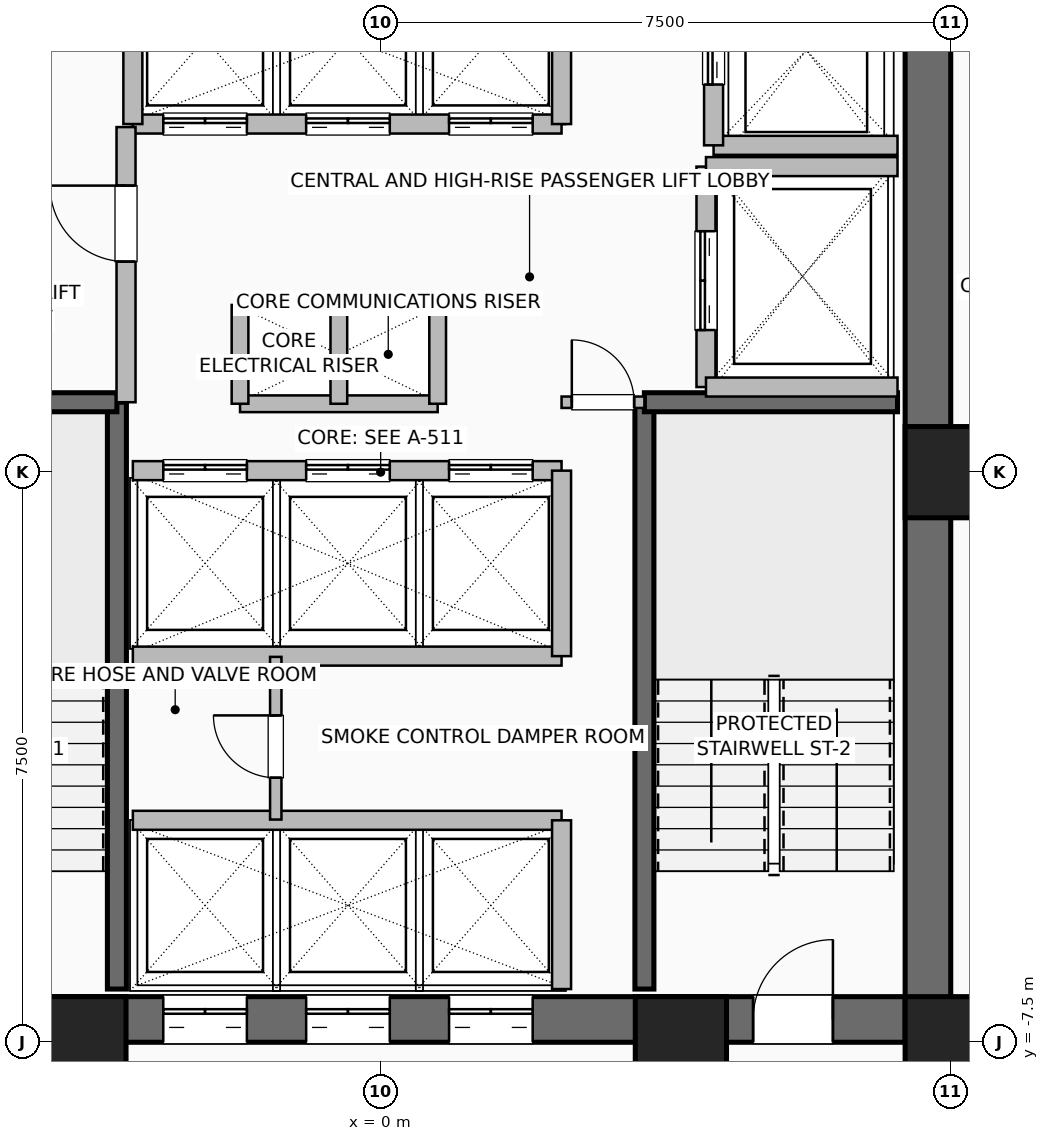
"""IFC4 building model, lengths in metres.
Left out: names, types, materials, properties, quantities, classifications, styles, units other than length and angle.
Written with IfcOpenShell. Run it as: python <this file> out.ifc"""

import sys

from ifc_helpers import new_model, si_unit, direction, frame, frame_2d, origin, origin_2d, place, context, subcontext, project, spatial, rectangle, hollow_rectangle, extrude, element, fill, save


model = new_model("IFC4")
c1 = context("Model", 3, precision=1e-05, world=origin(), true_north=direction((0.0, 1.0)))
c2 = subcontext(c1, "Body", "Model", "MODEL_VIEW")
j1 = project(units=[si_unit("LENGTHUNIT", "METRE"), si_unit("PLANEANGLEUNIT", "RADIAN")], contexts=[c1])
p1 = place(None, origin())
s1 = spatial("IfcSite", under=j1, at=p1, CompositionType="ELEMENT")
p2 = place(p1, origin())
s2 = spatial("IfcBuilding", under=s1, at=p2, CompositionType="ELEMENT")
p3 = place(p2, frame((0.0, 0.0, 41.0)))
s3 = spatial("IfcBuildingStorey", under=s2, at=p3, CompositionType="ELEMENT", Elevation=41.0)
for number, where, z_axis, x_axis in (
    (1, (-3.95, -7.5, 0.0), (0.0, 0.0, 1.0), (1.0, 0.0, 0.0)),
    (2, (3.95, -7.5, 0.0), (0.0, 0.0, 1.0), (1.0, 0.0, 0.0)),
    (3, (7.5, -7.5, 0.0), (0.0, 0.0, 1.0), (1.0, 0.0, 0.0)),
    (4, (7.5, 0.0, 0.0), (0.0, 0.0, 1.0), (1.0, 0.0, 0.0)),
):
    element("IfcColumn", number, at=place(p3, frame(where, z_axis=z_axis, x_axis=x_axis)), inside=s3, PredefinedType="COLUMN", context=c2, shape_type="SweptSolid", body=[
        extrude(hollow_rectangle(XDim=1.2, YDim=1.2, WallThickness=0.055, at=origin_2d()), origin(), (0.0, 0.0, 1.0), 3.5),
    ])
p4 = place(p3, frame((-7.5, -7.2, 0.0), z_axis=(0.0, 0.0, 1.0), x_axis=(1.0, 0.0, 0.0)))
e5 = element("IfcWall", 5, at=p4, inside=s3, PredefinedType="SHEAR", context=c2, shape_type="SweptSolid", body=[
    extrude(rectangle(XDim=15.0, YDim=0.6, at=frame_2d((7.5, 0.0))), origin(), (0.0, 0.0, 1.0), 3.25),
])
p5 = place(p4, frame((1.55, 0.0, 0.0)))
e6 = element("IfcOpeningElement", 6, at=p5, cuts=e5, PredefinedType="OPENING", context=c2, shape_type="SweptSolid", body=[
    extrude(rectangle(XDim=1.05, YDim=2.08, at=frame_2d((0.525, 1.04))), frame((0.0, 0.31, 0.0), z_axis=(0.0, -1.0, 0.0), x_axis=(1.0, 0.0, 0.0)), (0.0, 0.0, 1.0), 0.62),
])
p6 = place(p4, frame((12.4, 0.0, 0.0)))
e7 = element("IfcOpeningElement", 7, at=p6, cuts=e5, PredefinedType="OPENING", context=c2, shape_type="SweptSolid", body=[
    extrude(rectangle(XDim=1.05, YDim=2.08, at=frame_2d((0.525, 1.04))), frame((0.0, 0.31, 0.0), z_axis=(0.0, -1.0, 0.0), x_axis=(1.0, 0.0, 0.0)), (0.0, 0.0, 1.0), 0.62),
])
p7 = place(p4, frame((4.64, 0.0, 0.0)))
e8 = element("IfcOpeningElement", 8, at=p7, cuts=e5, PredefinedType="OPENING", context=c2, shape_type="SweptSolid", body=[
    extrude(rectangle(XDim=1.1, YDim=2.2, at=frame_2d((0.55, 1.1))), frame((0.0, 0.31, 0.0), z_axis=(0.0, -1.0, 0.0), x_axis=(1.0, 0.0, 0.0)), (0.0, 0.0, 1.0), 0.62),
])
p8 = place(p4, frame((6.52, 0.0, 0.0)))
e9 = element("IfcOpeningElement", 9, at=p8, cuts=e5, PredefinedType="OPENING", context=c2, shape_type="SweptSolid", body=[
    extrude(rectangle(XDim=1.1, YDim=2.2, at=frame_2d((0.55, 1.1))), frame((0.0, 0.31, 0.0), z_axis=(0.0, -1.0, 0.0), x_axis=(1.0, 0.0, 0.0)), (0.0, 0.0, 1.0), 0.62),
])
p9 = place(p4, frame((8.4, 0.0, 0.0)))
e10 = element("IfcOpeningElement", 10, at=p9, cuts=e5, PredefinedType="OPENING", context=c2, shape_type="SweptSolid", body=[
    extrude(rectangle(XDim=1.1, YDim=2.2, at=frame_2d((0.55, 1.1))), frame((0.0, 0.31, 0.0), z_axis=(0.0, -1.0, 0.0), x_axis=(1.0, 0.0, 0.0)), (0.0, 0.0, 1.0), 0.62),
])
p10 = place(p3, frame((7.2, -7.5, 0.0), z_axis=(0.0, 0.0, 1.0), x_axis=(0.0, 1.0, 0.0)))
e11 = element("IfcWall", 11, at=p10, inside=s3, PredefinedType="SHEAR", context=c2, shape_type="SweptSolid", body=[
    extrude(rectangle(XDim=15.0, YDim=0.6, at=frame_2d((7.5, 0.0))), origin(), (0.0, 0.0, 1.0), 3.25),
])
p11 = place(p3, frame((-3.47, -6.8, 0.0), z_axis=(0.0, 0.0, 1.0), x_axis=(0.0, 1.0, 0.0)))
e12 = element("IfcWall", 12, at=p11, inside=s3, PredefinedType="SHEAR", context=c2, shape_type="SweptSolid", body=[
    extrude(rectangle(XDim=7.72, YDim=0.25, at=frame_2d((3.86, 0.0))), origin(), (0.0, 0.0, 1.0), 3.25),
])
p12 = place(p3, frame((-6.8, 0.92, 0.0), z_axis=(0.0, 0.0, 1.0), x_axis=(1.0, 0.0, 0.0)))
e13 = element("IfcWall", 13, at=p12, inside=s3, PredefinedType="SHEAR", context=c2, shape_type="SweptSolid", body=[
    extrude(rectangle(XDim=3.33, YDim=0.25, at=frame_2d((1.665, 0.0))), origin(), (0.0, 0.0, 1.0), 3.25),
])
p13 = place(p3, frame((3.47, -6.8, 0.0), z_axis=(0.0, 0.0, 1.0), x_axis=(0.0, 1.0, 0.0)))
e14 = element("IfcWall", 14, at=p13, inside=s3, PredefinedType="SHEAR", context=c2, shape_type="SweptSolid", body=[
    extrude(rectangle(XDim=7.72, YDim=0.25, at=frame_2d((3.86, 0.0))), origin(), (0.0, 0.0, 1.0), 3.25),
])
p14 = place(p3, frame((3.47, 0.92, 0.0), z_axis=(0.0, 0.0, 1.0), x_axis=(1.0, 0.0, 0.0)))
e15 = element("IfcWall", 15, at=p14, inside=s3, PredefinedType="SHEAR", context=c2, shape_type="SweptSolid", body=[
    extrude(rectangle(XDim=3.33, YDim=0.25, at=frame_2d((1.665, 0.0))), origin(), (0.0, 0.0, 1.0), 3.25),
])
for number, where, z_axis, x_axis in (
    (16, (-1.85, 2.2, 0.0), (0.0, 0.0, 1.0), (1.0, 0.0, 0.0)),
    (17, (-1.85, 0.9, 0.0), (0.0, 0.0, 1.0), (1.0, 0.0, 0.0)),
):
    element("IfcWall", number, at=place(p3, frame(where, z_axis=z_axis, x_axis=x_axis)), inside=s3, PredefinedType="PARTITIONING", context=c2, shape_type="SweptSolid", body=[
        extrude(rectangle(XDim=2.6, YDim=0.22, at=frame_2d((1.3, 0.0))), origin(), (0.0, 0.0, 1.0), 3.25),
    ])
for number, where, z_axis, x_axis in (
    (18, (-0.55, 0.9, 0.0), (0.0, 0.0, 1.0), (0.0, 1.0, 0.0)),
    (19, (0.75, 0.9, 0.0), (0.0, 0.0, 1.0), (0.0, 1.0, 0.0)),
    (20, (-1.85, 0.9, 0.0), (0.0, 0.0, 1.0), (0.0, 1.0, 0.0)),
):
    element("IfcWall", number, at=place(p3, frame(where, z_axis=z_axis, x_axis=x_axis)), inside=s3, PredefinedType="PARTITIONING", context=c2, shape_type="SweptSolid", body=[
        extrude(rectangle(XDim=1.3, YDim=0.22, at=frame_2d((0.65, 0.0))), origin(), (0.0, 0.0, 1.0), 3.25),
    ])
p15 = place(p3, frame((-3.26, -4.58, 0.0), z_axis=(0.0, 0.0, 1.0), x_axis=(1.0, 0.0, 0.0)))
e21 = element("IfcWall", 21, at=p15, inside=s3, PredefinedType="SHEAR", context=c2, shape_type="SweptSolid", body=[
    extrude(rectangle(XDim=5.64, YDim=0.25, at=frame_2d((2.82, 0.0))), origin(), (0.0, 0.0, 1.0), 3.25),
])
p16 = place(p3, frame((2.38, -6.8, 0.0), z_axis=(0.0, 0.0, 1.0), x_axis=(0.0, 1.0, 0.0)))
e22 = element("IfcWall", 22, at=p16, inside=s3, PredefinedType="SHEAR", context=c2, shape_type="SweptSolid", body=[
    extrude(rectangle(XDim=2.22, YDim=0.25, at=frame_2d((1.11, 0.0))), origin(), (0.0, 0.0, 1.0), 3.25),
])
p17 = place(p3, frame((-3.26, 0.02, 0.0), z_axis=(0.0, 0.0, 1.0), x_axis=(1.0, 0.0, 0.0)))
e23 = element("IfcWall", 23, at=p17, inside=s3, PredefinedType="SHEAR", context=c2, shape_type="SweptSolid", body=[
    extrude(rectangle(XDim=5.64, YDim=0.25, at=frame_2d((2.82, 0.0))), origin(), (0.0, 0.0, 1.0), 3.25),
])
p18 = place(p17, frame((0.4, 0.0, 0.0)))
e24 = element("IfcOpeningElement", 24, at=p18, cuts=e23, PredefinedType="OPENING", context=c2, shape_type="SweptSolid", body=[
    extrude(rectangle(XDim=1.1, YDim=2.2, at=frame_2d((0.55, 1.1))), frame((0.0, 0.135, 0.0), z_axis=(0.0, -1.0, 0.0), x_axis=(1.0, 0.0, 0.0)), (0.0, 0.0, 1.0), 0.27),
])
p19 = place(p17, frame((2.28, 0.0, 0.0)))
e25 = element("IfcOpeningElement", 25, at=p19, cuts=e23, PredefinedType="OPENING", context=c2, shape_type="SweptSolid", body=[
    extrude(rectangle(XDim=1.1, YDim=2.2, at=frame_2d((0.55, 1.1))), frame((0.0, 0.135, 0.0), z_axis=(0.0, -1.0, 0.0), x_axis=(1.0, 0.0, 0.0)), (0.0, 0.0, 1.0), 0.27),
])
p20 = place(p17, frame((4.16, 0.0, 0.0)))
e26 = element("IfcOpeningElement", 26, at=p20, cuts=e23, PredefinedType="OPENING", context=c2, shape_type="SweptSolid", body=[
    extrude(rectangle(XDim=1.1, YDim=2.2, at=frame_2d((0.55, 1.1))), frame((0.0, 0.135, 0.0), z_axis=(0.0, -1.0, 0.0), x_axis=(1.0, 0.0, 0.0)), (0.0, 0.0, 1.0), 0.27),
])
p21 = place(p3, frame((-3.26, -2.42, 0.0), z_axis=(0.0, 0.0, 1.0), x_axis=(1.0, 0.0, 0.0)))
e27 = element("IfcWall", 27, at=p21, inside=s3, PredefinedType="SHEAR", context=c2, shape_type="SweptSolid", body=[
    extrude(rectangle(XDim=5.64, YDim=0.25, at=frame_2d((2.82, 0.0))), origin(), (0.0, 0.0, 1.0), 3.25),
])
p22 = place(p3, frame((2.38, -2.42, 0.0), z_axis=(0.0, 0.0, 1.0), x_axis=(0.0, 1.0, 0.0)))
e28 = element("IfcWall", 28, at=p22, inside=s3, PredefinedType="SHEAR", context=c2, shape_type="SweptSolid", body=[
    extrude(rectangle(XDim=2.44, YDim=0.25, at=frame_2d((1.22, 0.0))), origin(), (0.0, 0.0, 1.0), 3.25),
])
p23 = place(p3, frame((-3.26, 4.58, 0.0), z_axis=(0.0, 0.0, 1.0), x_axis=(1.0, 0.0, 0.0)))
e29 = element("IfcWall", 29, at=p23, inside=s3, PredefinedType="SHEAR", context=c2, shape_type="SweptSolid", body=[
    extrude(rectangle(XDim=5.64, YDim=0.25, at=frame_2d((2.82, 0.0))), origin(), (0.0, 0.0, 1.0), 3.25),
])
p24 = place(p23, frame((0.4, 0.0, 0.0)))
e30 = element("IfcOpeningElement", 30, at=p24, cuts=e29, PredefinedType="OPENING", context=c2, shape_type="SweptSolid", body=[
    extrude(rectangle(XDim=1.1, YDim=2.2, at=frame_2d((0.55, 1.1))), frame((0.0, 0.135, 0.0), z_axis=(0.0, -1.0, 0.0), x_axis=(1.0, 0.0, 0.0)), (0.0, 0.0, 1.0), 0.27),
])
p25 = place(p23, frame((2.28, 0.0, 0.0)))
e31 = element("IfcOpeningElement", 31, at=p25, cuts=e29, PredefinedType="OPENING", context=c2, shape_type="SweptSolid", body=[
    extrude(rectangle(XDim=1.1, YDim=2.2, at=frame_2d((0.55, 1.1))), frame((0.0, 0.135, 0.0), z_axis=(0.0, -1.0, 0.0), x_axis=(1.0, 0.0, 0.0)), (0.0, 0.0, 1.0), 0.27),
])
p26 = place(p23, frame((4.16, 0.0, 0.0)))
e32 = element("IfcOpeningElement", 32, at=p26, cuts=e29, PredefinedType="OPENING", context=c2, shape_type="SweptSolid", body=[
    extrude(rectangle(XDim=1.1, YDim=2.2, at=frame_2d((0.55, 1.1))), frame((0.0, 0.135, 0.0), z_axis=(0.0, -1.0, 0.0), x_axis=(1.0, 0.0, 0.0)), (0.0, 0.0, 1.0), 0.27),
])
for number, where, z_axis, x_axis in (
    (33, (-3.26, 4.58, 0.0), (0.0, 0.0, 1.0), (0.0, 1.0, 0.0)),
    (34, (2.38, 4.58, 0.0), (0.0, 0.0, 1.0), (0.0, 1.0, 0.0)),
):
    element("IfcWall", number, at=place(p3, frame(where, z_axis=z_axis, x_axis=x_axis)), inside=s3, PredefinedType="SHEAR", context=c2, shape_type="SweptSolid", body=[
        extrude(rectangle(XDim=2.22, YDim=0.25, at=frame_2d((1.11, 0.0))), origin(), (0.0, 0.0, 1.0), 3.25),
    ])
p27 = place(p3, frame((4.38, 4.3, 0.0), z_axis=(0.0, 0.0, 1.0), x_axis=(1.0, 0.0, 0.0)))
e35 = element("IfcWall", 35, at=p27, inside=s3, PredefinedType="SHEAR", context=c2, shape_type="SweptSolid", body=[
    extrude(rectangle(XDim=2.42, YDim=0.25, at=frame_2d((1.21, 0.0))), origin(), (0.0, 0.0, 1.0), 3.25),
])
p28 = place(p3, frame((4.38, 4.3, 0.0), z_axis=(0.0, 0.0, 1.0), x_axis=(0.0, 1.0, 0.0)))
e36 = element("IfcWall", 36, at=p28, inside=s3, PredefinedType="SHEAR", context=c2, shape_type="SweptSolid", body=[
    extrude(rectangle(XDim=2.5, YDim=0.25, at=frame_2d((1.25, 0.0))), origin(), (0.0, 0.0, 1.0), 3.25),
])
p29 = place(p28, frame((0.8, 0.0, 0.0)))
e37 = element("IfcOpeningElement", 37, at=p29, cuts=e36, PredefinedType="OPENING", context=c2, shape_type="SweptSolid", body=[
    extrude(rectangle(XDim=1.2, YDim=2.2, at=frame_2d((0.6, 1.1))), frame((0.0, 0.135, 0.0), z_axis=(0.0, -1.0, 0.0), x_axis=(1.0, 0.0, 0.0)), (0.0, 0.0, 1.0), 0.27),
])
p30 = place(p3, frame((4.28, 1.12, 0.0), z_axis=(0.0, 0.0, 1.0), x_axis=(0.0, 1.0, 0.0)))
e38 = element("IfcWall", 38, at=p30, inside=s3, PredefinedType="SHEAR", context=c2, shape_type="SweptSolid", body=[
    extrude(rectangle(XDim=2.9, YDim=0.25, at=frame_2d((1.45, 0.0))), origin(), (0.0, 0.0, 1.0), 3.25),
])
p31 = place(p30, frame((0.75, 0.0, 0.0)))
e39 = element("IfcOpeningElement", 39, at=p31, cuts=e38, PredefinedType="OPENING", context=c2, shape_type="SweptSolid", body=[
    extrude(rectangle(XDim=1.3, YDim=2.3, at=frame_2d((0.65, 1.15))), frame((0.0, 0.135, 0.0), z_axis=(0.0, -1.0, 0.0), x_axis=(1.0, 0.0, 0.0)), (0.0, 0.0, 1.0), 0.27),
])
for number, where, z_axis, x_axis in (
    (40, (4.28, 1.12, 0.0), (0.0, 0.0, 1.0), (1.0, 0.0, 0.0)),
    (41, (4.28, 4.02, 0.0), (0.0, 0.0, 1.0), (1.0, 0.0, 0.0)),
):
    element("IfcWall", number, at=place(p3, frame(where, z_axis=z_axis, x_axis=x_axis)), inside=s3, PredefinedType="SHEAR", context=c2, shape_type="SweptSolid", body=[
        extrude(rectangle(XDim=2.52, YDim=0.25, at=frame_2d((1.26, 0.0))), origin(), (0.0, 0.0, 1.0), 3.25),
    ])
p32 = place(p3, frame((-3.35, 0.92, 0.0), z_axis=(0.0, 0.0, 1.0), x_axis=(0.0, 1.0, 0.0)))
e42 = element("IfcWall", 42, at=p32, inside=s3, PredefinedType="SHEAR", context=c2, shape_type="SweptSolid", body=[
    extrude(rectangle(XDim=3.62, YDim=0.25, at=frame_2d((1.81, 0.0))), origin(), (0.0, 0.0, 1.0), 3.25),
])
p33 = place(p32, frame((1.85, 0.0, 0.0)))
e43 = element("IfcOpeningElement", 43, at=p33, cuts=e42, PredefinedType="OPENING", context=c2, shape_type="SweptSolid", body=[
    extrude(rectangle(XDim=1.0, YDim=2.08, at=frame_2d((0.5, 1.04))), frame((0.0, 0.135, 0.0), z_axis=(0.0, -1.0, 0.0), x_axis=(1.0, 0.0, 0.0)), (0.0, 0.0, 1.0), 0.27),
])
p34 = place(p3, frame((2.38, 0.92, 0.0), z_axis=(0.0, 0.0, 1.0), x_axis=(1.0, 0.0, 0.0)))
e44 = element("IfcWall", 44, at=p34, inside=s3, PredefinedType="PARTITIONING", context=c2, shape_type="SweptSolid", body=[
    extrude(rectangle(XDim=1.09, YDim=0.15, at=frame_2d((0.545, 0.0))), origin(), (0.0, 0.0, 1.0), 3.25),
])
p35 = place(p34, frame((0.135, 0.0, 0.0)))
e45 = element("IfcOpeningElement", 45, at=p35, cuts=e44, PredefinedType="OPENING", context=c2, shape_type="SweptSolid", body=[
    extrude(rectangle(XDim=0.82, YDim=2.05, at=frame_2d((0.41, 1.025))), frame((0.0, 0.085, 0.0), z_axis=(0.0, -1.0, 0.0), x_axis=(1.0, 0.0, 0.0)), (0.0, 0.0, 1.0), 0.17),
])
p36 = place(p3, frame((-1.38, -4.57, 0.0), z_axis=(0.0, 0.0, 1.0), x_axis=(0.0, 1.0, 0.0)))
e46 = element("IfcWall", 46, at=p36, inside=s3, PredefinedType="PARTITIONING", context=c2, shape_type="SweptSolid", body=[
    extrude(rectangle(XDim=2.14, YDim=0.15, at=frame_2d((1.07, 0.0))), origin(), (0.0, 0.0, 1.0), 3.25),
])
p37 = place(p36, frame((0.55, 0.0, 0.0)))
e47 = element("IfcOpeningElement", 47, at=p37, cuts=e46, PredefinedType="OPENING", context=c2, shape_type="SweptSolid", body=[
    extrude(rectangle(XDim=0.82, YDim=2.05, at=frame_2d((0.41, 1.025))), frame((0.0, 0.085, 0.0), z_axis=(0.0, -1.0, 0.0), x_axis=(1.0, 0.0, 0.0)), (0.0, 0.0, 1.0), 0.17),
])
p38 = place(p6, origin())
e48 = element("IfcDoor", 48, at=p38, inside=s3, OperationType="SINGLE_SWING_RIGHT", PredefinedType="DOOR", context=c2, shape_type="SweptSolid", body=[
    extrude(rectangle(XDim=1.05, YDim=2.08, at=frame_2d((0.525, 1.04))), frame((0.0, 0.025, 0.0), z_axis=(0.0, -1.0, 0.0), x_axis=(1.0, 0.0, 0.0)), (0.0, 0.0, 1.0), 0.05),
])
fill(e7, e48)
p39 = place(p7, origin())
e49 = element("IfcDoor", 49, at=p39, inside=s3, OperationType="DOUBLE_DOOR_SLIDING", PredefinedType="DOOR", context=c2, shape_type="SweptSolid", body=[
    extrude(rectangle(XDim=1.1, YDim=2.2, at=frame_2d((0.55, 1.1))), frame((0.0, 0.025, 0.0), z_axis=(0.0, -1.0, 0.0), x_axis=(1.0, 0.0, 0.0)), (0.0, 0.0, 1.0), 0.05),
])
fill(e8, e49)
p40 = place(p8, origin())
e50 = element("IfcDoor", 50, at=p40, inside=s3, OperationType="DOUBLE_DOOR_SLIDING", PredefinedType="DOOR", context=c2, shape_type="SweptSolid", body=[
    extrude(rectangle(XDim=1.1, YDim=2.2, at=frame_2d((0.55, 1.1))), frame((0.0, 0.025, 0.0), z_axis=(0.0, -1.0, 0.0), x_axis=(1.0, 0.0, 0.0)), (0.0, 0.0, 1.0), 0.05),
])
fill(e9, e50)
p41 = place(p9, origin())
e51 = element("IfcDoor", 51, at=p41, inside=s3, OperationType="DOUBLE_DOOR_SLIDING", PredefinedType="DOOR", context=c2, shape_type="SweptSolid", body=[
    extrude(rectangle(XDim=1.1, YDim=2.2, at=frame_2d((0.55, 1.1))), frame((0.0, 0.025, 0.0), z_axis=(0.0, -1.0, 0.0), x_axis=(1.0, 0.0, 0.0)), (0.0, 0.0, 1.0), 0.05),
])
fill(e10, e51)
p42 = place(p18, origin())
e52 = element("IfcDoor", 52, at=p42, inside=s3, OperationType="DOUBLE_DOOR_SLIDING", PredefinedType="DOOR", context=c2, shape_type="SweptSolid", body=[
    extrude(rectangle(XDim=1.1, YDim=2.2, at=frame_2d((0.55, 1.1))), frame((0.0, 0.025, 0.0), z_axis=(0.0, -1.0, 0.0), x_axis=(1.0, 0.0, 0.0)), (0.0, 0.0, 1.0), 0.05),
])
fill(e24, e52)
p43 = place(p19, origin())
e53 = element("IfcDoor", 53, at=p43, inside=s3, OperationType="DOUBLE_DOOR_SLIDING", PredefinedType="DOOR", context=c2, shape_type="SweptSolid", body=[
    extrude(rectangle(XDim=1.1, YDim=2.2, at=frame_2d((0.55, 1.1))), frame((0.0, 0.025, 0.0), z_axis=(0.0, -1.0, 0.0), x_axis=(1.0, 0.0, 0.0)), (0.0, 0.0, 1.0), 0.05),
])
fill(e25, e53)
p44 = place(p20, origin())
e54 = element("IfcDoor", 54, at=p44, inside=s3, OperationType="DOUBLE_DOOR_SLIDING", PredefinedType="DOOR", context=c2, shape_type="SweptSolid", body=[
    extrude(rectangle(XDim=1.1, YDim=2.2, at=frame_2d((0.55, 1.1))), frame((0.0, 0.025, 0.0), z_axis=(0.0, -1.0, 0.0), x_axis=(1.0, 0.0, 0.0)), (0.0, 0.0, 1.0), 0.05),
])
fill(e26, e54)
p45 = place(p24, origin())
e55 = element("IfcDoor", 55, at=p45, inside=s3, OperationType="DOUBLE_DOOR_SLIDING", PredefinedType="DOOR", context=c2, shape_type="SweptSolid", body=[
    extrude(rectangle(XDim=1.1, YDim=2.2, at=frame_2d((0.55, 1.1))), frame((0.0, 0.025, 0.0), z_axis=(0.0, -1.0, 0.0), x_axis=(1.0, 0.0, 0.0)), (0.0, 0.0, 1.0), 0.05),
])
fill(e30, e55)
p46 = place(p25, origin())
e56 = element("IfcDoor", 56, at=p46, inside=s3, OperationType="DOUBLE_DOOR_SLIDING", PredefinedType="DOOR", context=c2, shape_type="SweptSolid", body=[
    extrude(rectangle(XDim=1.1, YDim=2.2, at=frame_2d((0.55, 1.1))), frame((0.0, 0.025, 0.0), z_axis=(0.0, -1.0, 0.0), x_axis=(1.0, 0.0, 0.0)), (0.0, 0.0, 1.0), 0.05),
])
fill(e31, e56)
p47 = place(p26, origin())
e57 = element("IfcDoor", 57, at=p47, inside=s3, OperationType="DOUBLE_DOOR_SLIDING", PredefinedType="DOOR", context=c2, shape_type="SweptSolid", body=[
    extrude(rectangle(XDim=1.1, YDim=2.2, at=frame_2d((0.55, 1.1))), frame((0.0, 0.025, 0.0), z_axis=(0.0, -1.0, 0.0), x_axis=(1.0, 0.0, 0.0)), (0.0, 0.0, 1.0), 0.05),
])
fill(e32, e57)
p48 = place(p29, origin())
e58 = element("IfcDoor", 58, at=p48, inside=s3, OperationType="DOUBLE_DOOR_SLIDING", PredefinedType="DOOR", context=c2, shape_type="SweptSolid", body=[
    extrude(rectangle(XDim=1.2, YDim=2.2, at=frame_2d((0.6, 1.1))), frame((0.0, 0.025, 0.0), z_axis=(0.0, -1.0, 0.0), x_axis=(1.0, 0.0, 0.0)), (0.0, 0.0, 1.0), 0.05),
])
fill(e37, e58)
p49 = place(p31, origin())
e59 = element("IfcDoor", 59, at=p49, inside=s3, OperationType="DOUBLE_DOOR_SLIDING", PredefinedType="DOOR", context=c2, shape_type="SweptSolid", body=[
    extrude(rectangle(XDim=1.3, YDim=2.3, at=frame_2d((0.65, 1.15))), frame((0.0, 0.025, 0.0), z_axis=(0.0, -1.0, 0.0), x_axis=(1.0, 0.0, 0.0)), (0.0, 0.0, 1.0), 0.05),
])
fill(e39, e59)
p50 = place(p33, origin())
e60 = element("IfcDoor", 60, at=p50, inside=s3, OperationType="SINGLE_SWING_RIGHT", PredefinedType="DOOR", context=c2, shape_type="SweptSolid", body=[
    extrude(rectangle(XDim=1.0, YDim=2.08, at=frame_2d((0.5, 1.04))), frame((0.0, 0.025, 0.0), z_axis=(0.0, -1.0, 0.0), x_axis=(1.0, 0.0, 0.0)), (0.0, 0.0, 1.0), 0.05),
])
fill(e43, e60)
p51 = place(p35, origin())
e61 = element("IfcDoor", 61, at=p51, inside=s3, OperationType="SINGLE_SWING_LEFT", PredefinedType="DOOR", context=c2, shape_type="SweptSolid", body=[
    extrude(rectangle(XDim=0.82, YDim=2.05, at=frame_2d((0.41, 1.025))), frame((0.0, 0.025, 0.0), z_axis=(0.0, -1.0, 0.0), x_axis=(1.0, 0.0, 0.0)), (0.0, 0.0, 1.0), 0.05),
])
fill(e45, e61)
p52 = place(p37, origin())
e62 = element("IfcDoor", 62, at=p52, inside=s3, OperationType="SINGLE_SWING_RIGHT", PredefinedType="DOOR", context=c2, shape_type="SweptSolid", body=[
    extrude(rectangle(XDim=0.82, YDim=2.05, at=frame_2d((0.41, 1.025))), frame((0.0, 0.025, 0.0), z_axis=(0.0, -1.0, 0.0), x_axis=(1.0, 0.0, 0.0)), (0.0, 0.0, 1.0), 0.05),
])
fill(e47, e62)
save(model, sys.argv[1])
